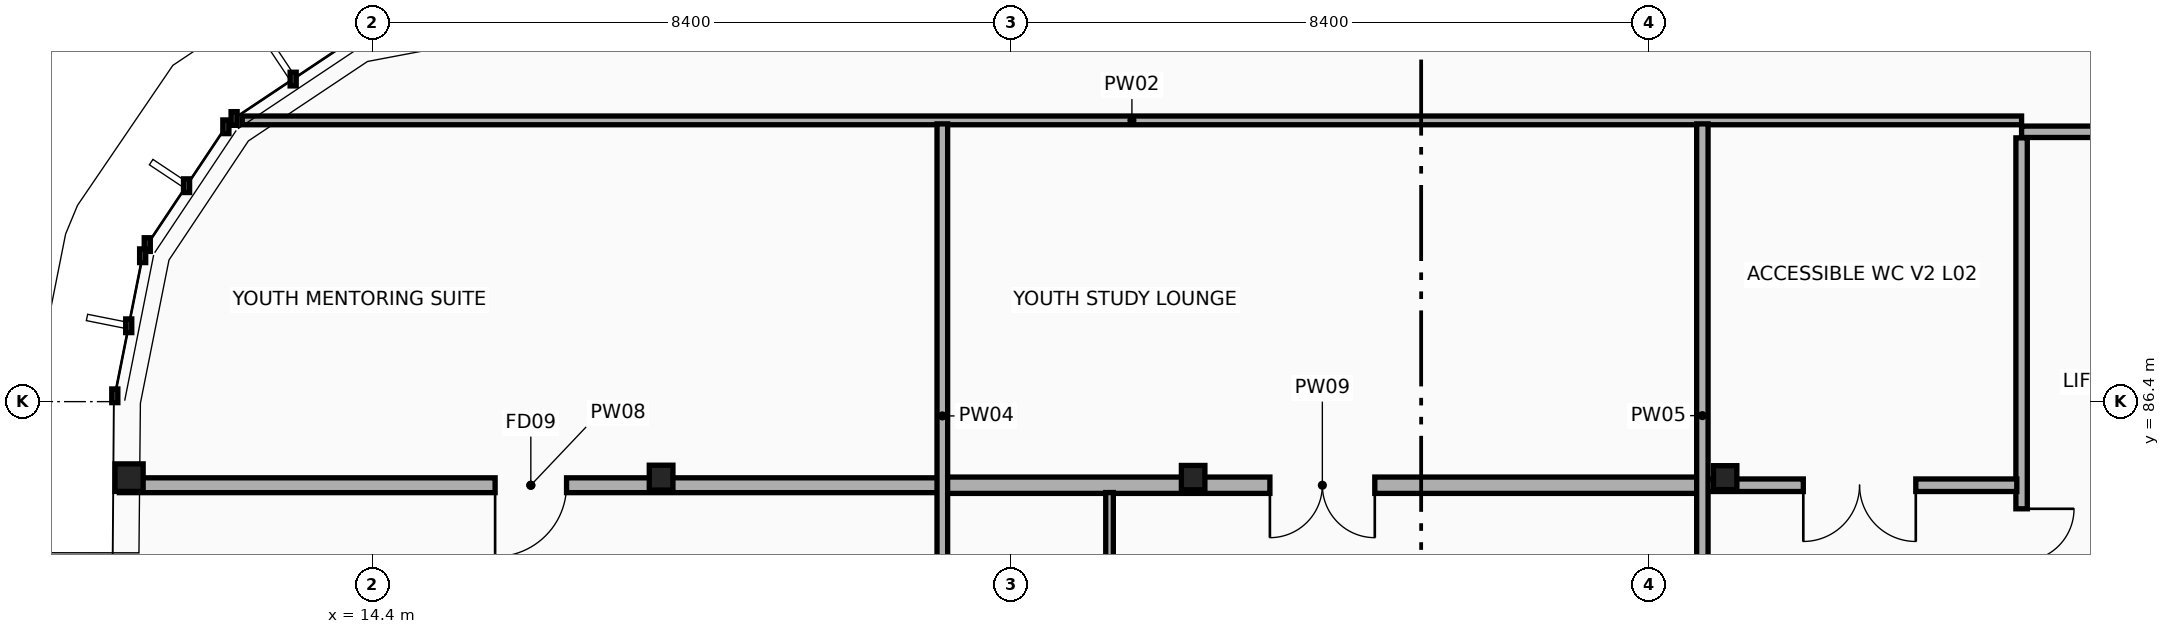
"""IFC4 building model, lengths in metres.
Left out: names, types, materials, properties, quantities, classifications, styles, units other than length and angle.
Written with IfcOpenShell. Run it as: python <this file> out.ifc"""

import sys

from ifc_helpers import new_model, si_unit, direction, frame, frame_2d, origin, origin_2d, place, context, subcontext, project, spatial, rectangle, i_section, extrude, element, fill, save


model = new_model("IFC4")
c1 = context("Model", 3, precision=1e-05, world=origin(), true_north=direction((0.0, 1.0)))
c2 = subcontext(c1, "Body", "Model", "MODEL_VIEW")
j1 = project(units=[si_unit("LENGTHUNIT", "METRE"), si_unit("PLANEANGLEUNIT", "RADIAN")], contexts=[c1])
p1 = place(None, origin())
s1 = spatial("IfcSite", under=j1, at=p1, CompositionType="ELEMENT")
p2 = place(p1, origin())
s2 = spatial("IfcBuilding", under=s1, at=p2, CompositionType="ELEMENT")
p3 = place(p2, frame((0.0, 0.0, 8.7)))
s3 = spatial("IfcBuildingStorey", under=s2, at=p3, CompositionType="ELEMENT", Elevation=8.7)
p4 = place(p3, frame((11.2, 85.4, 0.0), z_axis=(0.0, 0.0, 1.0), x_axis=(1.0, 0.0, 0.0)))
e1 = element("IfcColumn", 1, at=p4, inside=s3, PredefinedType="COLUMN", context=c2, shape_type="SweptSolid", body=[
    extrude(i_section(OverallWidth=0.371, OverallDepth=0.362, WebThickness=0.012, FlangeThickness=0.021, at=origin_2d()), origin(), (0.0, 0.0, 1.0), 3.9),
])
p5 = place(p3, frame((18.2, 85.4, 0.0), z_axis=(0.0, 0.0, 1.0), x_axis=(1.0, 0.0, 0.0)))
e2 = element("IfcColumn", 2, at=p5, inside=s3, PredefinedType="COLUMN", context=c2, shape_type="SweptSolid", body=[
    extrude(i_section(OverallWidth=0.311, OverallDepth=0.327, WebThickness=0.016, FlangeThickness=0.025, at=origin_2d()), origin(), (0.0, 0.0, 1.0), 3.9),
])
p6 = place(p3, frame((25.2, 85.4, 0.0), z_axis=(0.0, 0.0, 1.0), x_axis=(1.0, 0.0, 0.0)))
e3 = element("IfcColumn", 3, at=p6, inside=s3, PredefinedType="COLUMN", context=c2, shape_type="SweptSolid", body=[
    extrude(i_section(OverallWidth=0.309, OverallDepth=0.321, WebThickness=0.014, FlangeThickness=0.022, at=origin_2d()), origin(), (0.0, 0.0, 1.0), 3.9),
])
p7 = place(p3, frame((32.2, 85.4, 0.0), z_axis=(0.0, 0.0, 1.0), x_axis=(1.0, 0.0, 0.0)))
e4 = element("IfcColumn", 4, at=p7, inside=s3, PredefinedType="COLUMN", context=c2, shape_type="SweptSolid", body=[
    extrude(i_section(OverallWidth=0.307, OverallDepth=0.314, WebThickness=0.012, FlangeThickness=0.019, at=origin_2d()), origin(), (0.0, 0.0, 1.0), 3.9),
])
p8 = place(p3, frame((40.453, 89.95, 0.0), z_axis=(0.0, 0.0, 1.0), x_axis=(-1.0, 0.0, 0.0)))
e5 = element("IfcWall", 5, at=p8, inside=s3, PredefinedType="PARTITIONING", context=c2, shape_type="SweptSolid", body=[
    extrude(rectangle(XDim=4.353, YDim=0.15, at=frame_2d((2.176, 0.0))), origin(), (0.0, 0.0, 1.0), 3.68),
])
p9 = place(p3, frame((36.1, 89.87, 0.0), z_axis=(0.0, 0.0, 1.0), x_axis=(0.0, -1.0, 0.0)))
e6 = element("IfcWall", 6, at=p9, inside=s3, PredefinedType="PARTITIONING", context=c2, shape_type="SweptSolid", body=[
    extrude(rectangle(XDim=11.14, YDim=0.15, at=frame_2d((5.57, 0.0))), origin(), (0.0, 0.0, 1.0), 3.14),
])
p10 = place(p9, frame((4.88, 0.0, 0.0)))
e7 = element("IfcOpeningElement", 7, at=p10, cuts=e6, PredefinedType="OPENING", context=c2, shape_type="SweptSolid", body=[
    extrude(rectangle(XDim=1.38, YDim=2.2, at=frame_2d((0.69, 1.1))), frame((0.0, 0.085, 0.0), z_axis=(0.0, -1.0, 0.0), x_axis=(1.0, 0.0, 0.0)), (0.0, 0.0, 1.0), 0.17),
])
p11 = place(p3, frame((21.9, 85.3, 0.0), z_axis=(0.0, 0.0, 1.0), x_axis=(-1.0, 0.0, 0.0)))
e8 = element("IfcWall", 8, at=p11, inside=s3, PredefinedType="PARTITIONING", context=c2, shape_type="SweptSolid", body=[
    extrude(rectangle(XDim=10.828, YDim=0.195, at=frame_2d((5.414, 0.0))), origin(), (0.0, 0.0, 1.0), 3.14),
])
p12 = place(p11, frame((4.944, 0.0, 0.0)))
e9 = element("IfcOpeningElement", 9, at=p12, cuts=e8, PredefinedType="OPENING", context=c2, shape_type="SweptSolid", body=[
    extrude(rectangle(XDim=0.94, YDim=2.1, at=frame_2d((0.47, 1.05))), frame((0.0, 0.107, 0.0), z_axis=(0.0, -1.0, 0.0), x_axis=(1.0, 0.0, 0.0)), (0.0, 0.0, 1.0), 0.215),
])
p13 = place(p3, frame((31.9, 85.3, 0.0), z_axis=(0.0, 0.0, 1.0), x_axis=(-1.0, 0.0, 0.0)))
e10 = element("IfcWall", 10, at=p13, inside=s3, PredefinedType="PARTITIONING", context=c2, shape_type="SweptSolid", body=[
    extrude(rectangle(XDim=10.0, YDim=0.215, at=frame_2d((5.0, 0.0))), origin(), (0.0, 0.0, 1.0), 3.14),
])
p14 = place(p13, frame((4.31, 0.0, 0.0)))
e11 = element("IfcOpeningElement", 11, at=p14, cuts=e10, PredefinedType="OPENING", context=c2, shape_type="SweptSolid", body=[
    extrude(rectangle(XDim=1.38, YDim=2.2, at=frame_2d((0.69, 1.1))), frame((0.0, 0.117, 0.0), z_axis=(0.0, -1.0, 0.0), x_axis=(1.0, 0.0, 0.0)), (0.0, 0.0, 1.0), 0.235),
])
p15 = place(p3, frame((36.037, 85.3, 0.0), z_axis=(0.0, 0.0, 1.0), x_axis=(-1.0, 0.0, 0.0)))
e12 = element("IfcWall", 12, at=p15, inside=s3, PredefinedType="PARTITIONING", context=c2, shape_type="SweptSolid", body=[
    extrude(rectangle(XDim=4.137, YDim=0.165, at=frame_2d((2.069, 0.0))), origin(), (0.0, 0.0, 1.0), 3.14),
])
p16 = place(p15, frame((1.329, 0.0, 0.0)))
e13 = element("IfcOpeningElement", 13, at=p16, cuts=e12, PredefinedType="OPENING", context=c2, shape_type="SweptSolid", body=[
    extrude(rectangle(XDim=1.48, YDim=2.22, at=frame_2d((0.74, 1.11))), frame((0.0, 0.093, 0.0), z_axis=(0.0, -1.0, 0.0), x_axis=(1.0, 0.0, 0.0)), (0.0, 0.0, 1.0), 0.185),
])
p17 = place(p3, frame((24.1, 76.186, 0.0), z_axis=(0.0, 0.0, 1.0), x_axis=(0.0, 1.0, 0.0)))
e14 = element("IfcWall", 14, at=p17, inside=s3, PredefinedType="PARTITIONING", context=c2, shape_type="SweptSolid", body=[
    extrude(rectangle(XDim=9.018, YDim=0.1, at=frame_2d((4.509, 0.0))), origin(), (0.0, 0.0, 1.0), 3.14),
])
p18 = place(p3, frame((12.689, 90.1, 0.0), z_axis=(0.0, 0.0, 1.0), x_axis=(1.0, 0.0, 0.0)))
e15 = element("IfcWall", 15, at=p18, inside=s3, PredefinedType="PARTITIONING", context=c2, shape_type="SweptSolid", body=[
    extrude(rectangle(XDim=23.411, YDim=0.115, at=frame_2d((11.706, 0.0))), origin(), (0.0, 0.0, 1.0), 3.68),
])
p19 = place(p3, frame((21.9, 82.37, 0.0), z_axis=(0.0, 0.0, 1.0), x_axis=(0.0, 1.0, 0.0)))
e16 = element("IfcWall", 16, at=p19, inside=s3, PredefinedType="PARTITIONING", context=c2, shape_type="SweptSolid", body=[
    extrude(rectangle(XDim=7.684, YDim=0.14, at=frame_2d((3.842, 0.0))), origin(), (0.0, 0.0, 1.0), 3.14),
])
p20 = place(p3, frame((31.9, 82.378, 0.0), z_axis=(0.0, 0.0, 1.0), x_axis=(0.0, 1.0, 0.0)))
e17 = element("IfcWall", 17, at=p20, inside=s3, PredefinedType="PARTITIONING", context=c2, shape_type="SweptSolid", body=[
    extrude(rectangle(XDim=7.676, YDim=0.15, at=frame_2d((3.838, 0.0))), origin(), (0.0, 0.0, 1.0), 3.14),
])
p21 = place(p10, origin())
e18 = element("IfcDoor", 18, at=p21, inside=s3, OperationType="DOUBLE_DOOR_SINGLE_SWING", PredefinedType="DOOR", context=c2, shape_type="SweptSolid", body=[
    extrude(rectangle(XDim=1.38, YDim=2.2, at=frame_2d((0.69, 1.1))), frame((0.0, 0.025, 0.0), z_axis=(0.0, -1.0, 0.0), x_axis=(1.0, 0.0, 0.0)), (0.0, 0.0, 1.0), 0.05),
])
fill(e7, e18)
p22 = place(p12, origin())
e19 = element("IfcDoor", 19, at=p22, inside=s3, OperationType="SINGLE_SWING_RIGHT", PredefinedType="DOOR", context=c2, shape_type="SweptSolid", body=[
    extrude(rectangle(XDim=0.94, YDim=2.1, at=frame_2d((0.47, 1.05))), frame((0.0, 0.025, 0.0), z_axis=(0.0, -1.0, 0.0), x_axis=(1.0, 0.0, 0.0)), (0.0, 0.0, 1.0), 0.05),
])
fill(e9, e19)
p23 = place(p14, origin())
e20 = element("IfcDoor", 20, at=p23, inside=s3, OperationType="DOUBLE_DOOR_SINGLE_SWING", PredefinedType="DOOR", context=c2, shape_type="SweptSolid", body=[
    extrude(rectangle(XDim=1.38, YDim=2.2, at=frame_2d((0.69, 1.1))), frame((0.0, 0.025, 0.0), z_axis=(0.0, -1.0, 0.0), x_axis=(1.0, 0.0, 0.0)), (0.0, 0.0, 1.0), 0.05),
])
fill(e11, e20)
p24 = place(p16, origin())
e21 = element("IfcDoor", 21, at=p24, inside=s3, OperationType="DOUBLE_DOOR_SINGLE_SWING", PredefinedType="DOOR", context=c2, shape_type="SweptSolid", body=[
    extrude(rectangle(XDim=1.48, YDim=2.22, at=frame_2d((0.74, 1.11))), frame((0.0, 0.025, 0.0), z_axis=(0.0, -1.0, 0.0), x_axis=(1.0, 0.0, 0.0)), (0.0, 0.0, 1.0), 0.05),
])
fill(e13, e21)
save(model, sys.argv[1])
